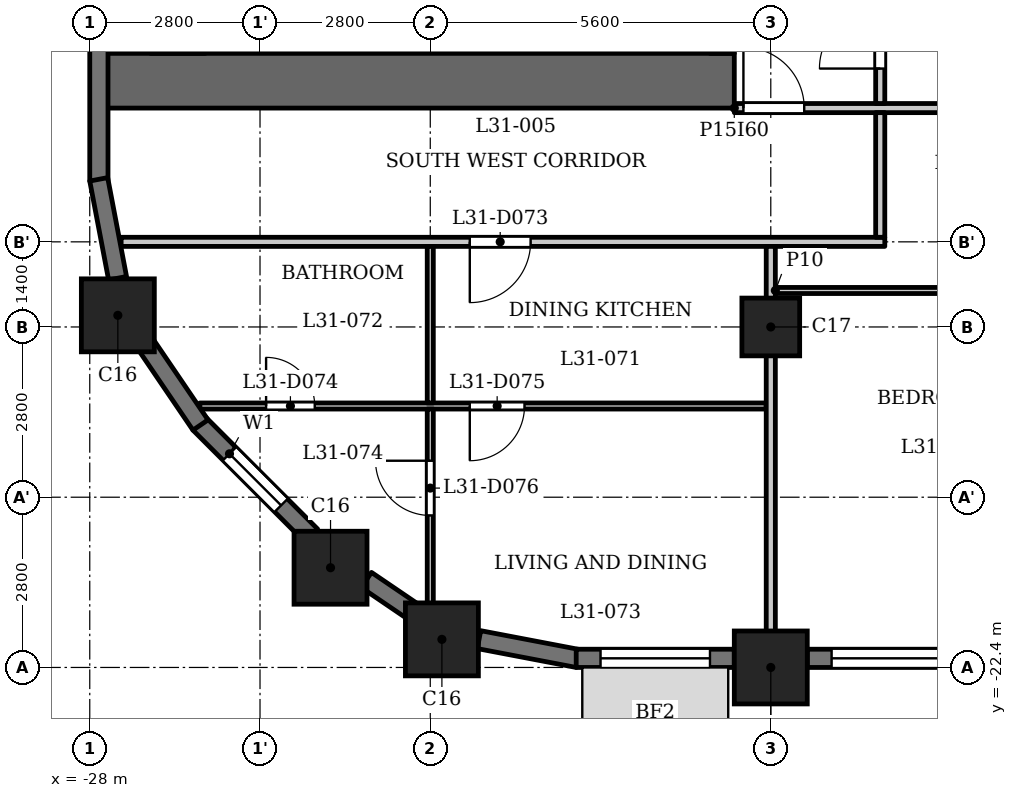
"""IFC4 building model, lengths in metres.
Left out: names, types, materials, properties, quantities, classifications, styles, units other than length and angle.
Written with IfcOpenShell. Run it as: python <this file> out.ifc"""

import sys

from ifc_helpers import new_model, si_unit, direction, frame, frame_2d, origin, origin_2d, place, context, subcontext, project, spatial, rectangle, extrude, element, fill, save


model = new_model("IFC4")
c1 = context("Model", 3, precision=1e-05, world=origin(), true_north=direction((0.0, 1.0)))
c2 = subcontext(c1, "Body", "Model", "MODEL_VIEW")
j1 = project(units=[si_unit("LENGTHUNIT", "METRE"), si_unit("PLANEANGLEUNIT", "RADIAN")], contexts=[c1])
p1 = place(None, origin())
s1 = spatial("IfcSite", under=j1, at=p1, CompositionType="ELEMENT")
p2 = place(p1, origin())
s2 = spatial("IfcBuilding", under=s1, at=p2, CompositionType="ELEMENT")
p3 = place(p2, frame((0.0, 0.0, 121.8)))
s3 = spatial("IfcBuildingStorey", under=s2, at=p3, CompositionType="ELEMENT", Elevation=121.8)
for number, where, z_axis, x_axis in (
    (1, (-22.209, -21.938, 0.0), (0.0, 0.0, 1.0), (1.0, 0.0, 0.0)),
    (2, (-16.8, -22.4, 0.0), (0.0, 0.0, 1.0), (1.0, 0.0, 0.0)),
    (3, (-27.538, -16.609, 0.0), (0.0, 0.0, 1.0), (1.0, 0.0, 0.0)),
    (4, (-24.04, -20.76, 0.0), (0.0, 0.0, 1.0), (1.0, 0.0, 0.0)),
):
    element("IfcColumn", number, at=place(p3, frame(where, z_axis=z_axis, x_axis=x_axis)), inside=s3, PredefinedType="COLUMN", context=c2, shape_type="SweptSolid", body=[
        extrude(rectangle(XDim=1.2, YDim=1.2, at=origin_2d()), origin(), (0.0, 0.0, 1.0), 3.5),
    ])
p4 = place(p3, frame((-16.8, -16.8, 0.0), z_axis=(0.0, 0.0, 1.0), x_axis=(1.0, 0.0, 0.0)))
e5 = element("IfcColumn", 5, at=p4, inside=s3, PredefinedType="COLUMN", context=c2, shape_type="SweptSolid", body=[
    extrude(rectangle(XDim=0.95, YDim=0.95, at=origin_2d()), origin(), (0.0, 0.0, 1.0), 3.5),
])
p5 = place(p3, frame((-26.197, -18.391, 0.0), z_axis=(0.0, 0.0, 1.0), x_axis=(0.707059830104, -0.707153729152, 0.0)))
e6 = element("IfcWall", 6, at=p5, inside=s3, PredefinedType="SOLIDWALL", context=c2, shape_type="SweptSolid", body=[
    extrude(rectangle(XDim=2.6, YDim=0.3, at=frame_2d((1.3, 0.0))), origin(), (0.0, 0.0, 1.0), 2.35),
])
p6 = place(p5, frame((0.7, 0.0, 0.6)))
e7 = element("IfcOpeningElement", 7, at=p6, cuts=e6, PredefinedType="OPENING", context=c2, shape_type="SweptSolid", body=[
    extrude(rectangle(XDim=1.2, YDim=1.55, at=frame_2d((0.6, 0.775))), frame((0.0, 0.16, 0.0), z_axis=(0.0, -1.0, 0.0), x_axis=(1.0, 0.0, 0.0)), (0.0, 0.0, 1.0), 0.32),
])
p7 = place(p3, frame((-23.451, -20.96, 0.0), z_axis=(0.0, 0.0, 1.0), x_axis=(0.827019434577, -0.562173331661, 0.0)))
e8 = element("IfcWall", 8, at=p7, inside=s3, PredefinedType="SOLIDWALL", context=c2, shape_type="SweptSolid", body=[
    extrude(rectangle(XDim=0.977, YDim=0.3, at=frame_2d((0.489, 0.0))), origin(), (0.0, 0.0, 1.0), 3.15),
])
p8 = place(p3, frame((-21.599, -21.942, 0.0), z_axis=(0.0, 0.0, 1.0), x_axis=(0.98228820662, -0.187376303559, 0.0)))
e9 = element("IfcWall", 9, at=p8, inside=s3, PredefinedType="SOLIDWALL", context=c2, shape_type="SweptSolid", body=[
    extrude(rectangle(XDim=1.656, YDim=0.3, at=frame_2d((0.828, 0.0))), origin(), (0.0, 0.0, 1.0), 2.35),
])
p9 = place(p3, frame((-20.0, -22.25, 0.0), z_axis=(0.0, 0.0, 1.0), x_axis=(1.0, 0.0, 0.0)))
e10 = element("IfcWall", 10, at=p9, inside=s3, PredefinedType="SOLIDWALL", context=c2, shape_type="SweptSolid", body=[
    extrude(rectangle(XDim=2.6, YDim=0.3, at=frame_2d((1.3, 0.0))), origin(), (0.0, 0.0, 1.0), 2.35),
])
p10 = place(p9, frame((0.4, 0.0, 0.9)))
e11 = element("IfcOpeningElement", 11, at=p10, cuts=e10, PredefinedType="OPENING", context=c2, shape_type="SweptSolid", body=[
    extrude(rectangle(XDim=1.8, YDim=1.25, at=frame_2d((0.9, 0.625))), frame((0.0, 0.16, 0.0), z_axis=(0.0, -1.0, 0.0), x_axis=(1.0, 0.0, 0.0)), (0.0, 0.0, 1.0), 0.32),
])
p11 = place(p3, frame((-16.2, -22.25, 0.0), z_axis=(0.0, 0.0, 1.0), x_axis=(1.0, 0.0, 0.0)))
e12 = element("IfcWall", 12, at=p11, inside=s3, PredefinedType="SOLIDWALL", context=c2, shape_type="SweptSolid", body=[
    extrude(rectangle(XDim=4.4, YDim=0.3, at=frame_2d((2.2, 0.0))), origin(), (0.0, 0.0, 1.0), 2.35),
])
p12 = place(p11, frame((0.4, 0.0, 1.2)))
e13 = element("IfcOpeningElement", 13, at=p12, cuts=e12, PredefinedType="OPENING", context=c2, shape_type="SweptSolid", body=[
    extrude(rectangle(XDim=3.6, YDim=0.95, at=frame_2d((1.8, 0.475))), frame((0.0, 0.16, 0.0), z_axis=(0.0, -1.0, 0.0), x_axis=(1.0, 0.0, 0.0)), (0.0, 0.0, 1.0), 0.32),
])
p13 = place(p3, frame((-27.85, -11.8, 0.0), z_axis=(0.0, 0.0, 1.0), x_axis=(0.0, -1.0, 0.0)))
e14 = element("IfcWall", 14, at=p13, inside=s3, PredefinedType="SOLIDWALL", context=c2, shape_type="SweptSolid", body=[
    extrude(rectangle(XDim=2.6, YDim=0.3, at=frame_2d((1.3, 0.0))), origin(), (0.0, 0.0, 1.0), 2.35),
])
for number, where, z_axis, x_axis in (
    (15, (-27.853, -14.372, 0.0), (0.0, 0.0, 1.0), (0.187, -0.982, 0.0)),
    (16, (-27.11, -17.043, 0.0), (0.0, 0.0, 1.0), (0.562, -0.827, 0.0)),
):
    element("IfcWall", number, at=place(p3, frame(where, z_axis=z_axis, x_axis=x_axis)), inside=s3, PredefinedType="SOLIDWALL", context=c2, shape_type="SweptSolid", body=[
        extrude(rectangle(XDim=1.656, YDim=0.3, at=frame_2d((0.828, 0.0))), origin(), (0.0, 0.0, 1.0), 2.35),
    ])
p14 = place(p3, frame((-17.4, -12.75, 0.0), z_axis=(0.0, 0.0, 1.0), x_axis=(-1.0, 0.0, 0.0)))
e17 = element("IfcWall", 17, at=p14, inside=s3, PredefinedType="SHEAR", context=c2, shape_type="SweptSolid", body=[
    extrude(rectangle(XDim=10.4, YDim=0.9, at=frame_2d((5.2, 0.0))), origin(), (0.0, 0.0, 1.0), 3.15),
])
p15 = place(p3, frame((-17.6, -12.3, 0.0), z_axis=(0.0, 0.0, 1.0), x_axis=(0.0, 1.0, 0.0)))
e18 = element("IfcWall", 18, at=p15, inside=s3, PredefinedType="SHEAR", context=c2, shape_type="SweptSolid", body=[
    extrude(rectangle(XDim=24.6, YDim=0.4, at=frame_2d((12.3, 0.0))), origin(), (0.0, 0.0, 1.0), 3.15),
])
p16 = place(p15, frame((6.0, 0.0, 0.0)))
e19 = element("IfcOpeningElement", 19, at=p16, cuts=e18, PredefinedType="OPENING", context=c2, shape_type="SweptSolid", body=[
    extrude(rectangle(XDim=1.1, YDim=2.1, at=frame_2d((0.55, 1.05))), frame((0.0, 0.21, 0.0), z_axis=(0.0, -1.0, 0.0), x_axis=(1.0, 0.0, 0.0)), (0.0, 0.0, 1.0), 0.42),
])
p17 = place(p15, frame((8.4, 0.0, 0.0)))
e20 = element("IfcOpeningElement", 20, at=p17, cuts=e18, PredefinedType="OPENING", context=c2, shape_type="SweptSolid", body=[
    extrude(rectangle(XDim=1.1, YDim=2.1, at=frame_2d((0.55, 1.05))), frame((0.0, 0.21, 0.0), z_axis=(0.0, -1.0, 0.0), x_axis=(1.0, 0.0, 0.0)), (0.0, 0.0, 1.0), 0.42),
])
p18 = place(p15, frame((10.8, 0.0, 0.0)))
e21 = element("IfcOpeningElement", 21, at=p18, cuts=e18, PredefinedType="OPENING", context=c2, shape_type="SweptSolid", body=[
    extrude(rectangle(XDim=1.1, YDim=2.1, at=frame_2d((0.55, 1.05))), frame((0.0, 0.21, 0.0), z_axis=(0.0, -1.0, 0.0), x_axis=(1.0, 0.0, 0.0)), (0.0, 0.0, 1.0), 0.42),
])
p19 = place(p15, frame((22.8, 0.0, 0.0)))
e22 = element("IfcOpeningElement", 22, at=p19, cuts=e18, PredefinedType="OPENING", context=c2, shape_type="SweptSolid", body=[
    extrude(rectangle(XDim=1.1, YDim=2.1, at=frame_2d((0.55, 1.05))), frame((0.0, 0.21, 0.0), z_axis=(0.0, -1.0, 0.0), x_axis=(1.0, 0.0, 0.0)), (0.0, 0.0, 1.0), 0.42),
])
p20 = place(p15, frame((0.7, 0.0, 0.0)))
e23 = element("IfcOpeningElement", 23, at=p20, cuts=e18, PredefinedType="OPENING", context=c2, shape_type="SweptSolid", body=[
    extrude(rectangle(XDim=1.1, YDim=2.1, at=frame_2d((0.55, 1.05))), frame((0.0, 0.21, 0.0), z_axis=(0.0, -1.0, 0.0), x_axis=(1.0, 0.0, 0.0)), (0.0, 0.0, 1.0), 0.42),
])
p21 = place(p15, frame((12.775, 0.0, 0.0)))
e24 = element("IfcOpeningElement", 24, at=p21, cuts=e18, PredefinedType="OPENING", context=c2, shape_type="SweptSolid", body=[
    extrude(rectangle(XDim=1.8, YDim=2.1, at=frame_2d((0.9, 1.05))), frame((0.0, 0.21, 0.0), z_axis=(0.0, -1.0, 0.0), x_axis=(1.0, 0.0, 0.0)), (0.0, 0.0, 1.0), 0.42),
])
p22 = place(p3, frame((-26.55, -12.3, 0.0), z_axis=(0.0, 0.0, 1.0), x_axis=(0.0, 1.0, 0.0)))
e25 = element("IfcWall", 25, at=p22, inside=s3, PredefinedType="SHEAR", context=c2, shape_type="SweptSolid", body=[
    extrude(rectangle(XDim=24.6, YDim=0.9, at=frame_2d((12.3, 0.0))), origin(), (0.0, 0.0, 1.0), 3.15),
])
p23 = place(p3, frame((-23.55, -12.3, 0.0), z_axis=(0.0, 0.0, 1.0), x_axis=(0.0, 1.0, 0.0)))
e26 = element("IfcWall", 26, at=p23, inside=s3, PredefinedType="PARTITIONING", context=c2, shape_type="SweptSolid", body=[
    extrude(rectangle(XDim=2.5, YDim=0.2, at=frame_2d((1.25, 0.0))), origin(), (0.0, 0.0, 1.0), 3.15),
])
p24 = place(p23, frame((0.8, 0.0, 0.0)))
e27 = element("IfcOpeningElement", 27, at=p24, cuts=e26, PredefinedType="OPENING", context=c2, shape_type="SweptSolid", body=[
    extrude(rectangle(XDim=0.9, YDim=2.1, at=frame_2d((0.45, 1.05))), frame((0.0, 0.11, 0.0), z_axis=(0.0, -1.0, 0.0), x_axis=(1.0, 0.0, 0.0)), (0.0, 0.0, 1.0), 0.22),
])
p25 = place(p3, frame((-26.19, -18.1, 0.0), z_axis=(0.0, 0.0, 1.0), x_axis=(1.0, 0.0, 0.0)))
e28 = element("IfcWall", 28, at=p25, inside=s3, PredefinedType="PARTITIONING", context=c2, shape_type="SweptSolid", body=[
    extrude(rectangle(XDim=9.315, YDim=0.1, at=frame_2d((4.658, 0.0))), origin(), (0.0, 0.0, 1.0), 3.15),
])
p26 = place(p25, frame((1.09, 0.0, 0.0)))
e29 = element("IfcOpeningElement", 29, at=p26, cuts=e28, PredefinedType="OPENING", context=c2, shape_type="SweptSolid", body=[
    extrude(rectangle(XDim=0.8, YDim=2.1, at=frame_2d((0.4, 1.05))), frame((0.0, 0.06, 0.0), z_axis=(0.0, -1.0, 0.0), x_axis=(1.0, 0.0, 0.0)), (0.0, 0.0, 1.0), 0.12),
])
p27 = place(p25, frame((4.44, 0.0, 0.0)))
e30 = element("IfcOpeningElement", 30, at=p27, cuts=e28, PredefinedType="OPENING", context=c2, shape_type="SweptSolid", body=[
    extrude(rectangle(XDim=0.9, YDim=2.1, at=frame_2d((0.45, 1.05))), frame((0.0, 0.06, 0.0), z_axis=(0.0, -1.0, 0.0), x_axis=(1.0, 0.0, 0.0)), (0.0, 0.0, 1.0), 0.12),
])
p28 = place(p3, frame((-16.725, -16.2, 0.0), z_axis=(0.0, 0.0, 1.0), x_axis=(1.0, 0.0, 0.0)))
e31 = element("IfcWall", 31, at=p28, inside=s3, PredefinedType="PARTITIONING", context=c2, shape_type="SweptSolid", body=[
    extrude(rectangle(XDim=33.45, YDim=0.1, at=frame_2d((16.725, 0.0))), origin(), (0.0, 0.0, 1.0), 3.15),
])
p29 = place(p28, frame((4.075, 0.0, 0.0)))
e32 = element("IfcOpeningElement", 32, at=p29, cuts=e31, PredefinedType="OPENING", context=c2, shape_type="SweptSolid", body=[
    extrude(rectangle(XDim=0.8, YDim=2.1, at=frame_2d((0.4, 1.05))), frame((0.0, 0.06, 0.0), z_axis=(0.0, -1.0, 0.0), x_axis=(1.0, 0.0, 0.0)), (0.0, 0.0, 1.0), 0.12),
])
p30 = place(p28, frame((9.425, 0.0, 0.0)))
e33 = element("IfcOpeningElement", 33, at=p30, cuts=e31, PredefinedType="OPENING", context=c2, shape_type="SweptSolid", body=[
    extrude(rectangle(XDim=0.9, YDim=2.1, at=frame_2d((0.45, 1.05))), frame((0.0, 0.06, 0.0), z_axis=(0.0, -1.0, 0.0), x_axis=(1.0, 0.0, 0.0)), (0.0, 0.0, 1.0), 0.12),
])
p31 = place(p28, frame((19.875, 0.0, 0.0)))
e34 = element("IfcOpeningElement", 34, at=p31, cuts=e31, PredefinedType="OPENING", context=c2, shape_type="SweptSolid", body=[
    extrude(rectangle(XDim=0.8, YDim=2.1, at=frame_2d((0.4, 1.05))), frame((0.0, 0.06, 0.0), z_axis=(0.0, -1.0, 0.0), x_axis=(1.0, 0.0, 0.0)), (0.0, 0.0, 1.0), 0.12),
])
p32 = place(p28, frame((17.375, 0.0, 0.0)))
e35 = element("IfcOpeningElement", 35, at=p32, cuts=e31, PredefinedType="OPENING", context=c2, shape_type="SweptSolid", body=[
    extrude(rectangle(XDim=0.9, YDim=2.1, at=frame_2d((0.45, 1.05))), frame((0.0, 0.06, 0.0), z_axis=(0.0, -1.0, 0.0), x_axis=(1.0, 0.0, 0.0)), (0.0, 0.0, 1.0), 0.12),
])
p33 = place(p28, frame((12.525, 0.0, 0.0)))
e36 = element("IfcOpeningElement", 36, at=p33, cuts=e31, PredefinedType="OPENING", context=c2, shape_type="SweptSolid", body=[
    extrude(rectangle(XDim=0.9, YDim=2.1, at=frame_2d((0.45, 1.05))), frame((0.0, 0.06, 0.0), z_axis=(0.0, -1.0, 0.0), x_axis=(1.0, 0.0, 0.0)), (0.0, 0.0, 1.0), 0.12),
])
p34 = place(p28, frame((14.775, 0.0, 0.0)))
e37 = element("IfcOpeningElement", 37, at=p34, cuts=e31, PredefinedType="OPENING", context=c2, shape_type="SweptSolid", body=[
    extrude(rectangle(XDim=0.9, YDim=2.1, at=frame_2d((0.45, 1.05))), frame((0.0, 0.06, 0.0), z_axis=(0.0, -1.0, 0.0), x_axis=(1.0, 0.0, 0.0)), (0.0, 0.0, 1.0), 0.12),
])
p35 = place(p28, frame((26.475, 0.0, 0.0)))
e38 = element("IfcOpeningElement", 38, at=p35, cuts=e31, PredefinedType="OPENING", context=c2, shape_type="SweptSolid", body=[
    extrude(rectangle(XDim=0.8, YDim=2.1, at=frame_2d((0.4, 1.05))), frame((0.0, 0.06, 0.0), z_axis=(0.0, -1.0, 0.0), x_axis=(1.0, 0.0, 0.0)), (0.0, 0.0, 1.0), 0.12),
])
p36 = place(p28, frame((23.725, 0.0, 0.0)))
e39 = element("IfcOpeningElement", 39, at=p36, cuts=e31, PredefinedType="OPENING", context=c2, shape_type="SweptSolid", body=[
    extrude(rectangle(XDim=0.9, YDim=2.1, at=frame_2d((0.45, 1.05))), frame((0.0, 0.06, 0.0), z_axis=(0.0, -1.0, 0.0), x_axis=(1.0, 0.0, 0.0)), (0.0, 0.0, 1.0), 0.12),
])
p37 = place(p28, frame((29.075, 0.0, 0.0)))
e40 = element("IfcOpeningElement", 40, at=p37, cuts=e31, PredefinedType="OPENING", context=c2, shape_type="SweptSolid", body=[
    extrude(rectangle(XDim=0.8, YDim=2.1, at=frame_2d((0.4, 1.05))), frame((0.0, 0.06, 0.0), z_axis=(0.0, -1.0, 0.0), x_axis=(1.0, 0.0, 0.0)), (0.0, 0.0, 1.0), 0.12),
])
p38 = place(p28, frame((30.675, 0.0, 0.0)))
e41 = element("IfcOpeningElement", 41, at=p38, cuts=e31, PredefinedType="OPENING", context=c2, shape_type="SweptSolid", body=[
    extrude(rectangle(XDim=0.9, YDim=2.1, at=frame_2d((0.45, 1.05))), frame((0.0, 0.06, 0.0), z_axis=(0.0, -1.0, 0.0), x_axis=(1.0, 0.0, 0.0)), (0.0, 0.0, 1.0), 0.12),
])
p39 = place(p3, frame((-27.484, -15.4, 0.0), z_axis=(0.0, 0.0, 1.0), x_axis=(1.0, 0.0, 0.0)))
e42 = element("IfcWall", 42, at=p39, inside=s3, PredefinedType="PARTITIONING", context=c2, shape_type="SweptSolid", body=[
    extrude(rectangle(XDim=12.559, YDim=0.15, at=frame_2d((6.279, 0.0))), origin(), (0.0, 0.0, 1.0), 3.15),
])
p40 = place(p39, frame((5.734, 0.0, 0.0)))
e43 = element("IfcOpeningElement", 43, at=p40, cuts=e42, PredefinedType="OPENING", context=c2, shape_type="SweptSolid", body=[
    extrude(rectangle(XDim=1.0, YDim=2.1, at=frame_2d((0.5, 1.05))), frame((0.0, 0.085, 0.0), z_axis=(0.0, -1.0, 0.0), x_axis=(1.0, 0.0, 0.0)), (0.0, 0.0, 1.0), 0.17),
])
p41 = place(p3, frame((-17.4, -13.2, 0.0), z_axis=(0.0, 0.0, 1.0), x_axis=(1.0, 0.0, 0.0)))
e44 = element("IfcWall", 44, at=p41, inside=s3, PredefinedType="PARTITIONING", context=c2, shape_type="SweptSolid", body=[
    extrude(rectangle(XDim=34.8, YDim=0.15, at=frame_2d((17.4, 0.0))), origin(), (0.0, 0.0, 1.0), 3.15),
])
p42 = place(p41, frame((0.15, 0.0, 0.0)))
e45 = element("IfcOpeningElement", 45, at=p42, cuts=e44, PredefinedType="OPENING", context=c2, shape_type="SweptSolid", body=[
    extrude(rectangle(XDim=1.0, YDim=2.1, at=frame_2d((0.5, 1.05))), frame((0.0, 0.085, 0.0), z_axis=(0.0, -1.0, 0.0), x_axis=(1.0, 0.0, 0.0)), (0.0, 0.0, 1.0), 0.17),
])
p43 = place(p41, frame((33.55, 0.0, 0.0)))
e46 = element("IfcOpeningElement", 46, at=p43, cuts=e44, PredefinedType="OPENING", context=c2, shape_type="SweptSolid", body=[
    extrude(rectangle(XDim=1.0, YDim=2.1, at=frame_2d((0.5, 1.05))), frame((0.0, 0.085, 0.0), z_axis=(0.0, -1.0, 0.0), x_axis=(1.0, 0.0, 0.0)), (0.0, 0.0, 1.0), 0.17),
])
p44 = place(p41, frame((10.1, 0.0, 0.0)))
e47 = element("IfcOpeningElement", 47, at=p44, cuts=e44, PredefinedType="OPENING", context=c2, shape_type="SweptSolid", body=[
    extrude(rectangle(XDim=1.0, YDim=2.1, at=frame_2d((0.5, 1.05))), frame((0.0, 0.085, 0.0), z_axis=(0.0, -1.0, 0.0), x_axis=(1.0, 0.0, 0.0)), (0.0, 0.0, 1.0), 0.17),
])
p45 = place(p41, frame((15.7, 0.0, 0.0)))
e48 = element("IfcOpeningElement", 48, at=p45, cuts=e44, PredefinedType="OPENING", context=c2, shape_type="SweptSolid", body=[
    extrude(rectangle(XDim=1.0, YDim=2.1, at=frame_2d((0.5, 1.05))), frame((0.0, 0.085, 0.0), z_axis=(0.0, -1.0, 0.0), x_axis=(1.0, 0.0, 0.0)), (0.0, 0.0, 1.0), 0.17),
])
p46 = place(p41, frame((24.9, 0.0, 0.0)))
e49 = element("IfcOpeningElement", 49, at=p46, cuts=e44, PredefinedType="OPENING", context=c2, shape_type="SweptSolid", body=[
    extrude(rectangle(XDim=1.0, YDim=2.1, at=frame_2d((0.5, 1.05))), frame((0.0, 0.085, 0.0), z_axis=(0.0, -1.0, 0.0), x_axis=(1.0, 0.0, 0.0)), (0.0, 0.0, 1.0), 0.17),
])
p47 = place(p3, frame((-22.4, -21.72, 0.0), z_axis=(0.0, 0.0, 1.0), x_axis=(0.0, 1.0, 0.0)))
e50 = element("IfcWall", 50, at=p47, inside=s3, PredefinedType="PARTITIONING", context=c2, shape_type="SweptSolid", body=[
    extrude(rectangle(XDim=3.57, YDim=0.1, at=frame_2d((1.785, 0.0))), origin(), (0.0, 0.0, 1.0), 3.15),
])
p48 = place(p47, frame((1.82, 0.0, 0.0)))
e51 = element("IfcOpeningElement", 51, at=p48, cuts=e50, PredefinedType="OPENING", context=c2, shape_type="SweptSolid", body=[
    extrude(rectangle(XDim=0.9, YDim=2.1, at=frame_2d((0.45, 1.05))), frame((0.0, 0.06, 0.0), z_axis=(0.0, -1.0, 0.0), x_axis=(1.0, 0.0, 0.0)), (0.0, 0.0, 1.0), 0.12),
])
p49 = place(p3, frame((-22.4, -18.05, 0.0), z_axis=(0.0, 0.0, 1.0), x_axis=(0.0, 1.0, 0.0)))
e52 = element("IfcWall", 52, at=p49, inside=s3, PredefinedType="PARTITIONING", context=c2, shape_type="SweptSolid", body=[
    extrude(rectangle(XDim=2.575, YDim=0.1, at=frame_2d((1.288, 0.0))), origin(), (0.0, 0.0, 1.0), 3.15),
])
p50 = place(p3, frame((-16.8, -22.98, 0.0), z_axis=(0.0, 0.0, 1.0), x_axis=(0.0, 1.0, 0.0)))
e53 = element("IfcWall", 53, at=p50, inside=s3, PredefinedType="PARTITIONING", context=c2, shape_type="SweptSolid", body=[
    extrude(rectangle(XDim=7.505, YDim=0.15, at=frame_2d((3.752, 0.0))), origin(), (0.0, 0.0, 1.0), 3.15),
])
p51 = place(p3, frame((-15.0, -15.325, 0.0), z_axis=(0.0, 0.0, 1.0), x_axis=(0.0, 1.0, 0.0)))
e54 = element("IfcWall", 54, at=p51, inside=s3, PredefinedType="PARTITIONING", context=c2, shape_type="SweptSolid", body=[
    extrude(rectangle(XDim=2.05, YDim=0.15, at=frame_2d((1.025, 0.0))), origin(), (0.0, 0.0, 1.0), 3.15),
])
p52 = place(p3, frame((-15.0, -13.125, 0.0), z_axis=(0.0, 0.0, 1.0), x_axis=(0.0, 1.0, 0.0)))
e55 = element("IfcWall", 55, at=p52, inside=s3, PredefinedType="PARTITIONING", context=c2, shape_type="SweptSolid", body=[
    extrude(rectangle(XDim=6.356, YDim=0.15, at=frame_2d((3.178, 0.0))), origin(), (0.0, 0.0, 1.0), 3.15),
])
p53 = place(p52, frame((0.575, 0.0, 0.0)))
e56 = element("IfcOpeningElement", 56, at=p53, cuts=e55, PredefinedType="OPENING", context=c2, shape_type="SweptSolid", body=[
    extrude(rectangle(XDim=1.0, YDim=2.1, at=frame_2d((0.5, 1.05))), frame((0.0, 0.085, 0.0), z_axis=(0.0, -1.0, 0.0), x_axis=(1.0, 0.0, 0.0)), (0.0, 0.0, 1.0), 0.17),
])
p54 = place(p53, origin())
e57 = element("IfcDoor", 57, at=p54, inside=s3, OperationType="SINGLE_SWING_RIGHT", PredefinedType="DOOR", context=c2, shape_type="SweptSolid", body=[
    extrude(rectangle(XDim=1.0, YDim=2.1, at=frame_2d((0.5, 1.05))), frame((0.0, 0.025, 0.0), z_axis=(0.0, -1.0, 0.0), x_axis=(1.0, 0.0, 0.0)), (0.0, 0.0, 1.0), 0.05),
])
fill(e56, e57)
p55 = place(p42, origin())
e58 = element("IfcDoor", 58, at=p55, inside=s3, OperationType="SINGLE_SWING_RIGHT", PredefinedType="DOOR", context=c2, shape_type="SweptSolid", body=[
    extrude(rectangle(XDim=1.0, YDim=2.1, at=frame_2d((0.5, 1.05))), frame((0.0, 0.025, 0.0), z_axis=(0.0, -1.0, 0.0), x_axis=(1.0, 0.0, 0.0)), (0.0, 0.0, 1.0), 0.05),
])
fill(e45, e58)
p56 = place(p40, origin())
e59 = element("IfcDoor", 59, at=p56, inside=s3, OperationType="SINGLE_SWING_LEFT", PredefinedType="DOOR", context=c2, shape_type="SweptSolid", body=[
    extrude(rectangle(XDim=1.0, YDim=2.1, at=frame_2d((0.5, 1.05))), frame((0.0, 0.025, 0.0), z_axis=(0.0, -1.0, 0.0), x_axis=(1.0, 0.0, 0.0)), (0.0, 0.0, 1.0), 0.05),
])
fill(e43, e59)
p57 = place(p26, origin())
e60 = element("IfcDoor", 60, at=p57, inside=s3, OperationType="SINGLE_SWING_RIGHT", PredefinedType="DOOR", context=c2, shape_type="SweptSolid", body=[
    extrude(rectangle(XDim=0.8, YDim=2.1, at=frame_2d((0.4, 1.05))), frame((0.0, 0.025, 0.0), z_axis=(0.0, -1.0, 0.0), x_axis=(1.0, 0.0, 0.0)), (0.0, 0.0, 1.0), 0.05),
])
fill(e29, e60)
p58 = place(p27, origin())
e61 = element("IfcDoor", 61, at=p58, inside=s3, OperationType="SINGLE_SWING_LEFT", PredefinedType="DOOR", context=c2, shape_type="SweptSolid", body=[
    extrude(rectangle(XDim=0.9, YDim=2.1, at=frame_2d((0.45, 1.05))), frame((0.0, 0.025, 0.0), z_axis=(0.0, -1.0, 0.0), x_axis=(1.0, 0.0, 0.0)), (0.0, 0.0, 1.0), 0.05),
])
fill(e30, e61)
p59 = place(p48, origin())
e62 = element("IfcDoor", 62, at=p59, inside=s3, OperationType="SINGLE_SWING_LEFT", PredefinedType="DOOR", context=c2, shape_type="SweptSolid", body=[
    extrude(rectangle(XDim=0.9, YDim=2.1, at=frame_2d((0.45, 1.05))), frame((0.0, 0.025, 0.0), z_axis=(0.0, -1.0, 0.0), x_axis=(1.0, 0.0, 0.0)), (0.0, 0.0, 1.0), 0.05),
])
fill(e51, e62)
p60 = place(p6, origin())
e63 = element("IfcWindow", 63, at=p60, inside=s3, PartitioningType="SINGLE_PANEL", PredefinedType="WINDOW", context=c2, shape_type="SweptSolid", body=[
    extrude(rectangle(XDim=1.2, YDim=1.55, at=frame_2d((0.6, 0.775))), frame((0.0, 0.03, 0.0), z_axis=(0.0, -1.0, 0.0), x_axis=(1.0, 0.0, 0.0)), (0.0, 0.0, 1.0), 0.06),
])
fill(e7, e63)
p61 = place(p10, origin())
e64 = element("IfcWindow", 64, at=p61, inside=s3, PartitioningType="SINGLE_PANEL", PredefinedType="WINDOW", context=c2, shape_type="SweptSolid", body=[
    extrude(rectangle(XDim=1.8, YDim=1.25, at=frame_2d((0.9, 0.625))), frame((0.0, 0.03, 0.0), z_axis=(0.0, -1.0, 0.0), x_axis=(1.0, 0.0, 0.0)), (0.0, 0.0, 1.0), 0.06),
])
fill(e11, e64)
p62 = place(p12, origin())
e65 = element("IfcWindow", 65, at=p62, inside=s3, PartitioningType="SINGLE_PANEL", PredefinedType="WINDOW", context=c2, shape_type="SweptSolid", body=[
    extrude(rectangle(XDim=3.6, YDim=0.95, at=frame_2d((1.8, 0.475))), frame((0.0, 0.03, 0.0), z_axis=(0.0, -1.0, 0.0), x_axis=(1.0, 0.0, 0.0)), (0.0, 0.0, 1.0), 0.06),
])
fill(e13, e65)
save(model, sys.argv[1])
